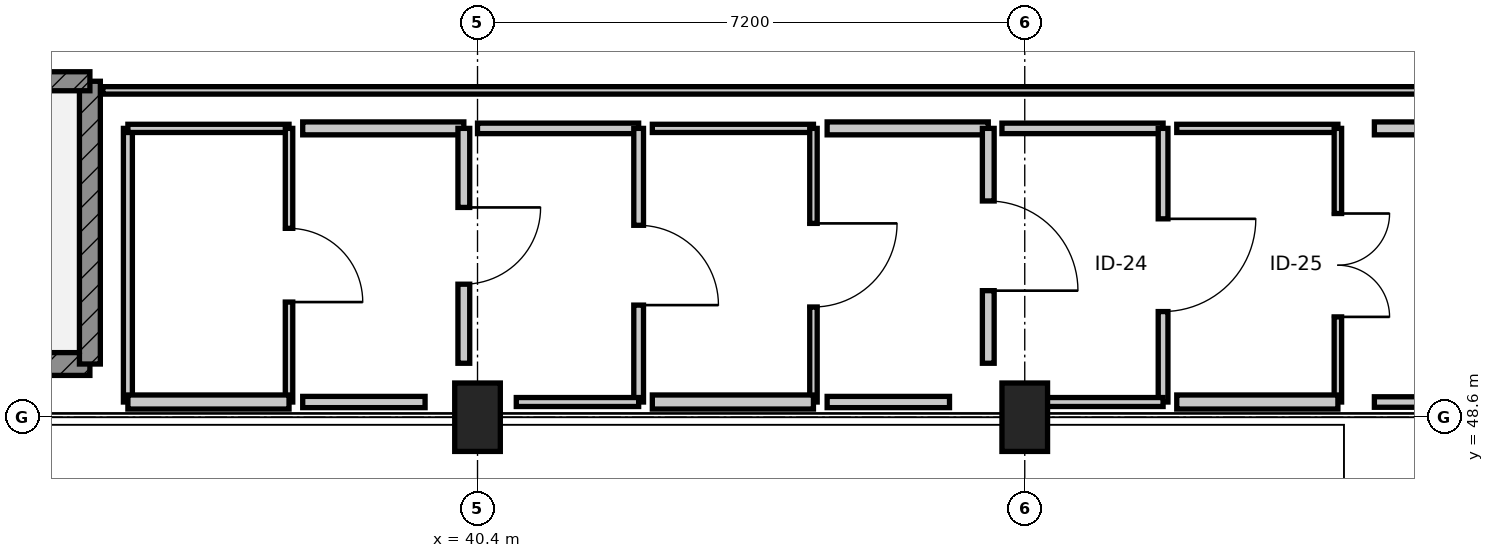
"""IFC4 building model, lengths in metres.
Left out: names, types, materials, properties, quantities, classifications, styles, units other than length and angle.
Written with IfcOpenShell. Run it as: python <this file> out.ifc"""

import sys

from ifc_helpers import new_model, si_unit, direction, frame, frame_2d, origin, origin_2d, place, context, subcontext, project, spatial, rectangle, extrude, element, fill, save


model = new_model("IFC4")
c1 = context("Model", 3, precision=1e-05, world=origin(), true_north=direction((0.0, 1.0)))
c2 = subcontext(c1, "Body", "Model", "MODEL_VIEW")
j1 = project(units=[si_unit("LENGTHUNIT", "METRE"), si_unit("PLANEANGLEUNIT", "RADIAN")], contexts=[c1])
p1 = place(None, origin())
s1 = spatial("IfcSite", under=j1, at=p1, CompositionType="ELEMENT")
p2 = place(p1, origin())
s2 = spatial("IfcBuilding", under=s1, at=p2, CompositionType="ELEMENT")
p3 = place(p2, frame((0.0, 0.0, 5.4)))
s3 = spatial("IfcBuildingStorey", under=s2, at=p3, CompositionType="ELEMENT", Elevation=5.4)
for number, where, z_axis, x_axis in (
    (1, (40.4, 48.6, 0.0), (0.0, 0.0, 1.0), (1.0, 0.0, 0.0)),
    (2, (47.6, 48.6, 0.0), (0.0, 0.0, 1.0), (1.0, 0.0, 0.0)),
):
    element("IfcColumn", number, at=place(p3, frame(where, z_axis=z_axis, x_axis=x_axis)), inside=s3, PredefinedType="COLUMN", context=c2, shape_type="SweptSolid", body=[
        extrude(rectangle(XDim=0.6, YDim=0.9, at=origin_2d()), origin(), (0.0, 0.0, 1.0), 5.1),
    ])
p4 = place(p3, frame((26.7, 49.3, 0.0), z_axis=(0.0, 0.0, 1.0), x_axis=(1.0, 0.0, 0.0)))
e3 = element("IfcWall", 3, at=p4, inside=s3, PredefinedType="SHEAR", context=c2, shape_type="SweptSolid", body=[
    extrude(rectangle(XDim=8.6, YDim=0.3, at=frame_2d((4.3, 0.0))), origin(), (0.0, 0.0, 1.0), 4.78),
])
p5 = place(p3, frame((35.3, 49.3, 0.0), z_axis=(0.0, 0.0, 1.0), x_axis=(0.0, 1.0, 0.0)))
e4 = element("IfcWall", 4, at=p5, inside=s3, PredefinedType="SHEAR", context=c2, shape_type="SweptSolid", body=[
    extrude(rectangle(XDim=3.72, YDim=0.275, at=frame_2d((1.86, 0.0))), origin(), (0.0, 0.0, 1.0), 4.78),
])
p6 = place(p3, frame((35.3, 53.02, 0.0), z_axis=(0.0, 0.0, 1.0), x_axis=(-1.0, 0.0, 0.0)))
e5 = element("IfcWall", 5, at=p6, inside=s3, PredefinedType="SHEAR", context=c2, shape_type="SweptSolid", body=[
    extrude(rectangle(XDim=8.6, YDim=0.25, at=frame_2d((4.3, 0.0))), origin(), (0.0, 0.0, 1.0), 4.78),
])
p7 = place(p6, frame((7.06, 0.0, 0.0)))
e6 = element("IfcOpeningElement", 6, at=p7, cuts=e5, PredefinedType="OPENING", context=c2, shape_type="SweptSolid", body=[
    extrude(rectangle(XDim=1.1, YDim=2.1, at=frame_2d((0.55, 1.05))), frame((0.0, 0.135, 0.0), z_axis=(0.0, -1.0, 0.0), x_axis=(1.0, 0.0, 0.0)), (0.0, 0.0, 1.0), 0.27),
])
p8 = place(p3, frame((35.8, 48.8, 0.0), z_axis=(0.0, 0.0, 1.0), x_axis=(0.0, 1.0, 0.0)))
e7 = element("IfcWall", 7, at=p8, inside=s3, PredefinedType="PARTITIONING", context=c2, shape_type="SweptSolid", body=[
    extrude(rectangle(XDim=3.6, YDim=0.118, at=frame_2d((1.8, 0.0))), origin(), (0.0, 0.0, 1.0), 4.78),
])
p9 = place(p3, frame((35.8, 52.4, 0.0), z_axis=(0.0, 0.0, 1.0), x_axis=(1.0, 0.0, 0.0)))
e8 = element("IfcWall", 8, at=p9, inside=s3, PredefinedType="PARTITIONING", context=c2, shape_type="SweptSolid", body=[
    extrude(rectangle(XDim=2.12, YDim=0.108, at=frame_2d((1.06, 0.0))), origin(), (0.0, 0.0, 1.0), 4.78),
])
p10 = place(p3, frame((37.92, 52.4, 0.0), z_axis=(0.0, 0.0, 1.0), x_axis=(0.0, -1.0, 0.0)))
e9 = element("IfcWall", 9, at=p10, inside=s3, PredefinedType="PARTITIONING", context=c2, shape_type="SweptSolid", body=[
    extrude(rectangle(XDim=3.6, YDim=0.098, at=frame_2d((1.8, 0.0))), origin(), (0.0, 0.0, 1.0), 4.78),
])
p11 = place(p10, frame((1.315, 0.0, 0.0)))
e10 = element("IfcOpeningElement", 10, at=p11, cuts=e9, PredefinedType="OPENING", context=c2, shape_type="SweptSolid", body=[
    extrude(rectangle(XDim=0.97, YDim=2.16, at=frame_2d((0.485, 1.08))), frame((0.0, 0.059, 0.0), z_axis=(0.0, -1.0, 0.0), x_axis=(1.0, 0.0, 0.0)), (0.0, 0.0, 1.0), 0.118),
])
p12 = place(p3, frame((37.92, 48.8, 0.0), z_axis=(0.0, 0.0, 1.0), x_axis=(-1.0, 0.0, 0.0)))
e11 = element("IfcWall", 11, at=p12, inside=s3, PredefinedType="PARTITIONING", context=c2, shape_type="SweptSolid", body=[
    extrude(rectangle(XDim=2.12, YDim=0.185, at=frame_2d((1.06, 0.0))), origin(), (0.0, 0.0, 1.0), 4.153),
])
p13 = place(p3, frame((38.1, 52.4, 0.0), z_axis=(0.0, 0.0, 1.0), x_axis=(1.0, 0.0, 0.0)))
e12 = element("IfcWall", 12, at=p13, inside=s3, PredefinedType="PARTITIONING", context=c2, shape_type="SweptSolid", body=[
    extrude(rectangle(XDim=2.12, YDim=0.17, at=frame_2d((1.06, 0.0))), origin(), (0.0, 0.0, 1.0), 4.229),
])
p14 = place(p3, frame((40.22, 52.4, 0.0), z_axis=(0.0, 0.0, 1.0), x_axis=(0.0, -1.0, 0.0)))
e13 = element("IfcWall", 13, at=p14, inside=s3, PredefinedType="PARTITIONING", context=c2, shape_type="SweptSolid", body=[
    extrude(rectangle(XDim=3.09, YDim=0.155, at=frame_2d((1.545, 0.0))), origin(), (0.0, 0.0, 1.0), 4.229),
])
p15 = place(p14, frame((1.04, 0.0, 0.0)))
e14 = element("IfcOpeningElement", 14, at=p15, cuts=e13, PredefinedType="OPENING", context=c2, shape_type="SweptSolid", body=[
    extrude(rectangle(XDim=1.01, YDim=2.16, at=frame_2d((0.505, 1.08))), frame((0.0, 0.087, 0.0), z_axis=(0.0, -1.0, 0.0), x_axis=(1.0, 0.0, 0.0)), (0.0, 0.0, 1.0), 0.175),
])
p16 = place(p3, frame((39.71, 48.8, 0.0), z_axis=(0.0, 0.0, 1.0), x_axis=(-1.0, 0.0, 0.0)))
e15 = element("IfcWall", 15, at=p16, inside=s3, PredefinedType="PARTITIONING", context=c2, shape_type="SweptSolid", body=[
    extrude(rectangle(XDim=1.61, YDim=0.148, at=frame_2d((0.805, 0.0))), origin(), (0.0, 0.0, 1.0), 4.153),
])
p17 = place(p3, frame((40.4, 52.4, 0.0), z_axis=(0.0, 0.0, 1.0), x_axis=(1.0, 0.0, 0.0)))
e16 = element("IfcWall", 16, at=p17, inside=s3, PredefinedType="PARTITIONING", context=c2, shape_type="SweptSolid", body=[
    extrude(rectangle(XDim=2.12, YDim=0.138, at=frame_2d((1.06, 0.0))), origin(), (0.0, 0.0, 1.0), 4.229),
])
p18 = place(p3, frame((42.52, 52.4, 0.0), z_axis=(0.0, 0.0, 1.0), x_axis=(0.0, -1.0, 0.0)))
e17 = element("IfcWall", 17, at=p18, inside=s3, PredefinedType="PARTITIONING", context=c2, shape_type="SweptSolid", body=[
    extrude(rectangle(XDim=3.6, YDim=0.128, at=frame_2d((1.8, 0.0))), origin(), (0.0, 0.0, 1.0), 4.407),
])
p19 = place(p18, frame((1.275, 0.0, 0.0)))
e18 = element("IfcOpeningElement", 18, at=p19, cuts=e17, PredefinedType="OPENING", context=c2, shape_type="SweptSolid", body=[
    extrude(rectangle(XDim=1.05, YDim=2.18, at=frame_2d((0.525, 1.09))), frame((0.0, 0.074, 0.0), z_axis=(0.0, -1.0, 0.0), x_axis=(1.0, 0.0, 0.0)), (0.0, 0.0, 1.0), 0.148),
])
p20 = place(p3, frame((42.52, 48.8, 0.0), z_axis=(0.0, 0.0, 1.0), x_axis=(-1.0, 0.0, 0.0)))
e19 = element("IfcWall", 19, at=p20, inside=s3, PredefinedType="PARTITIONING", context=c2, shape_type="SweptSolid", body=[
    extrude(rectangle(XDim=1.61, YDim=0.118, at=frame_2d((0.805, 0.0))), origin(), (0.0, 0.0, 1.0), 4.153),
])
p21 = place(p3, frame((42.7, 52.4, 0.0), z_axis=(0.0, 0.0, 1.0), x_axis=(1.0, 0.0, 0.0)))
e20 = element("IfcWall", 20, at=p21, inside=s3, PredefinedType="PARTITIONING", context=c2, shape_type="SweptSolid", body=[
    extrude(rectangle(XDim=2.12, YDim=0.108, at=frame_2d((1.06, 0.0))), origin(), (0.0, 0.0, 1.0), 4.78),
])
p22 = place(p3, frame((44.82, 52.4, 0.0), z_axis=(0.0, 0.0, 1.0), x_axis=(0.0, -1.0, 0.0)))
e21 = element("IfcWall", 21, at=p22, inside=s3, PredefinedType="PARTITIONING", context=c2, shape_type="SweptSolid", body=[
    extrude(rectangle(XDim=3.6, YDim=0.098, at=frame_2d((1.8, 0.0))), origin(), (0.0, 0.0, 1.0), 4.407),
])
p23 = place(p22, frame((1.25, 0.0, 0.0)))
e22 = element("IfcOpeningElement", 22, at=p23, cuts=e21, PredefinedType="OPENING", context=c2, shape_type="SweptSolid", body=[
    extrude(rectangle(XDim=1.1, YDim=2.18, at=frame_2d((0.55, 1.09))), frame((0.0, 0.059, 0.0), z_axis=(0.0, -1.0, 0.0), x_axis=(1.0, 0.0, 0.0)), (0.0, 0.0, 1.0), 0.118),
])
p24 = place(p3, frame((44.82, 48.8, 0.0), z_axis=(0.0, 0.0, 1.0), x_axis=(-1.0, 0.0, 0.0)))
e23 = element("IfcWall", 23, at=p24, inside=s3, PredefinedType="PARTITIONING", context=c2, shape_type="SweptSolid", body=[
    extrude(rectangle(XDim=2.12, YDim=0.185, at=frame_2d((1.06, 0.0))), origin(), (0.0, 0.0, 1.0), 4.153),
])
p25 = place(p3, frame((45.0, 52.4, 0.0), z_axis=(0.0, 0.0, 1.0), x_axis=(1.0, 0.0, 0.0)))
e24 = element("IfcWall", 24, at=p25, inside=s3, PredefinedType="PARTITIONING", context=c2, shape_type="SweptSolid", body=[
    extrude(rectangle(XDim=2.12, YDim=0.17, at=frame_2d((1.06, 0.0))), origin(), (0.0, 0.0, 1.0), 4.407),
])
p26 = place(p3, frame((47.12, 52.4, 0.0), z_axis=(0.0, 0.0, 1.0), x_axis=(0.0, -1.0, 0.0)))
e25 = element("IfcWall", 25, at=p26, inside=s3, PredefinedType="PARTITIONING", context=c2, shape_type="SweptSolid", body=[
    extrude(rectangle(XDim=3.09, YDim=0.155, at=frame_2d((1.545, 0.0))), origin(), (0.0, 0.0, 1.0), 4.407),
])
p27 = place(p26, frame((0.955, 0.0, 0.0)))
e26 = element("IfcOpeningElement", 26, at=p27, cuts=e25, PredefinedType="OPENING", context=c2, shape_type="SweptSolid", body=[
    extrude(rectangle(XDim=1.18, YDim=2.22, at=frame_2d((0.59, 1.11))), frame((0.0, 0.087, 0.0), z_axis=(0.0, -1.0, 0.0), x_axis=(1.0, 0.0, 0.0)), (0.0, 0.0, 1.0), 0.175),
])
p28 = place(p3, frame((46.61, 48.8, 0.0), z_axis=(0.0, 0.0, 1.0), x_axis=(-1.0, 0.0, 0.0)))
e27 = element("IfcWall", 27, at=p28, inside=s3, PredefinedType="PARTITIONING", context=c2, shape_type="SweptSolid", body=[
    extrude(rectangle(XDim=1.61, YDim=0.148, at=frame_2d((0.805, 0.0))), origin(), (0.0, 0.0, 1.0), 4.153),
])
p29 = place(p3, frame((47.3, 52.4, 0.0), z_axis=(0.0, 0.0, 1.0), x_axis=(1.0, 0.0, 0.0)))
e28 = element("IfcWall", 28, at=p29, inside=s3, PredefinedType="PARTITIONING", context=c2, shape_type="SweptSolid", body=[
    extrude(rectangle(XDim=2.12, YDim=0.138, at=frame_2d((1.06, 0.0))), origin(), (0.0, 0.0, 1.0), 4.229),
])
p30 = place(p3, frame((49.42, 52.4, 0.0), z_axis=(0.0, 0.0, 1.0), x_axis=(0.0, -1.0, 0.0)))
e29 = element("IfcWall", 29, at=p30, inside=s3, PredefinedType="PARTITIONING", context=c2, shape_type="SweptSolid", body=[
    extrude(rectangle(XDim=3.6, YDim=0.128, at=frame_2d((1.8, 0.0))), origin(), (0.0, 0.0, 1.0), 4.407),
])
p31 = place(p30, frame((1.19, 0.0, 0.0)))
e30 = element("IfcOpeningElement", 30, at=p31, cuts=e29, PredefinedType="OPENING", context=c2, shape_type="SweptSolid", body=[
    extrude(rectangle(XDim=1.22, YDim=2.24, at=frame_2d((0.61, 1.12))), frame((0.0, 0.074, 0.0), z_axis=(0.0, -1.0, 0.0), x_axis=(1.0, 0.0, 0.0)), (0.0, 0.0, 1.0), 0.148),
])
p32 = place(p3, frame((49.42, 48.8, 0.0), z_axis=(0.0, 0.0, 1.0), x_axis=(-1.0, 0.0, 0.0)))
e31 = element("IfcWall", 31, at=p32, inside=s3, PredefinedType="PARTITIONING", context=c2, shape_type="SweptSolid", body=[
    extrude(rectangle(XDim=1.61, YDim=0.118, at=frame_2d((0.805, 0.0))), origin(), (0.0, 0.0, 1.0), 4.153),
])
p33 = place(p3, frame((49.6, 52.4, 0.0), z_axis=(0.0, 0.0, 1.0), x_axis=(1.0, 0.0, 0.0)))
e32 = element("IfcWall", 32, at=p33, inside=s3, PredefinedType="PARTITIONING", context=c2, shape_type="SweptSolid", body=[
    extrude(rectangle(XDim=2.12, YDim=0.108, at=frame_2d((1.06, 0.0))), origin(), (0.0, 0.0, 1.0), 4.78),
])
p34 = place(p3, frame((51.72, 52.4, 0.0), z_axis=(0.0, 0.0, 1.0), x_axis=(0.0, -1.0, 0.0)))
e33 = element("IfcWall", 33, at=p34, inside=s3, PredefinedType="PARTITIONING", context=c2, shape_type="SweptSolid", body=[
    extrude(rectangle(XDim=3.6, YDim=0.098, at=frame_2d((1.8, 0.0))), origin(), (0.0, 0.0, 1.0), 4.407),
])
p35 = place(p34, frame((1.12, 0.0, 0.0)))
e34 = element("IfcOpeningElement", 34, at=p35, cuts=e33, PredefinedType="OPENING", context=c2, shape_type="SweptSolid", body=[
    extrude(rectangle(XDim=1.36, YDim=2.22, at=frame_2d((0.68, 1.11))), frame((0.0, 0.059, 0.0), z_axis=(0.0, -1.0, 0.0), x_axis=(1.0, 0.0, 0.0)), (0.0, 0.0, 1.0), 0.118),
])
p36 = place(p3, frame((51.72, 48.8, 0.0), z_axis=(0.0, 0.0, 1.0), x_axis=(-1.0, 0.0, 0.0)))
e35 = element("IfcWall", 35, at=p36, inside=s3, PredefinedType="PARTITIONING", context=c2, shape_type="SweptSolid", body=[
    extrude(rectangle(XDim=2.12, YDim=0.185, at=frame_2d((1.06, 0.0))), origin(), (0.0, 0.0, 1.0), 4.153),
])
p37 = place(p3, frame((52.2, 52.4, 0.0), z_axis=(0.0, 0.0, 1.0), x_axis=(1.0, 0.0, 0.0)))
e36 = element("IfcWall", 36, at=p37, inside=s3, PredefinedType="PARTITIONING", context=c2, shape_type="SweptSolid", body=[
    extrude(rectangle(XDim=9.2, YDim=0.17, at=frame_2d((4.6, 0.0))), origin(), (0.0, 0.0, 1.0), 4.229),
])
p38 = place(p37, frame((3.82, 0.0, 0.0)))
e37 = element("IfcOpeningElement", 37, at=p38, cuts=e36, PredefinedType="OPENING", context=c2, shape_type="SweptSolid", body=[
    extrude(rectangle(XDim=1.56, YDim=2.26, at=frame_2d((0.78, 1.13))), frame((0.0, 0.095, 0.0), z_axis=(0.0, -1.0, 0.0), x_axis=(1.0, 0.0, 0.0)), (0.0, 0.0, 1.0), 0.19),
])
p39 = place(p3, frame((57.555, 48.8, 0.0), z_axis=(0.0, 0.0, 1.0), x_axis=(-1.0, 0.0, 0.0)))
e38 = element("IfcWall", 38, at=p39, inside=s3, PredefinedType="PARTITIONING", context=c2, shape_type="SweptSolid", body=[
    extrude(rectangle(XDim=5.355, YDim=0.138, at=frame_2d((2.677, 0.0))), origin(), (0.0, 0.0, 1.0), 4.153),
])
p40 = place(p3, frame((54.0, 52.9, 0.0), z_axis=(0.0, 0.0, 1.0), x_axis=(-1.0, 0.0, 0.0)))
e39 = element("IfcWall", 39, at=p40, inside=s3, PredefinedType="PARTITIONING", context=c2, shape_type="SweptSolid", body=[
    extrude(rectangle(XDim=18.53, YDim=0.098, at=frame_2d((9.265, 0.0))), origin(), (0.0, 0.0, 1.0), 4.229),
])
p41 = place(p11, origin())
e40 = element("IfcDoor", 40, at=p41, inside=s3, OperationType="SINGLE_SWING_RIGHT", PredefinedType="DOOR", context=c2, shape_type="SweptSolid", body=[
    extrude(rectangle(XDim=0.97, YDim=2.16, at=frame_2d((0.485, 1.08))), frame((0.0, 0.025, 0.0), z_axis=(0.0, -1.0, 0.0), x_axis=(1.0, 0.0, 0.0)), (0.0, 0.0, 1.0), 0.05),
])
fill(e10, e40)
p42 = place(p15, origin())
e41 = element("IfcDoor", 41, at=p42, inside=s3, OperationType="SINGLE_SWING_LEFT", PredefinedType="DOOR", context=c2, shape_type="SweptSolid", body=[
    extrude(rectangle(XDim=1.01, YDim=2.16, at=frame_2d((0.505, 1.08))), frame((0.0, 0.025, 0.0), z_axis=(0.0, -1.0, 0.0), x_axis=(1.0, 0.0, 0.0)), (0.0, 0.0, 1.0), 0.05),
])
fill(e14, e41)
p43 = place(p19, origin())
e42 = element("IfcDoor", 42, at=p43, inside=s3, OperationType="SINGLE_SWING_RIGHT", PredefinedType="DOOR", context=c2, shape_type="SweptSolid", body=[
    extrude(rectangle(XDim=1.05, YDim=2.18, at=frame_2d((0.525, 1.09))), frame((0.0, 0.025, 0.0), z_axis=(0.0, -1.0, 0.0), x_axis=(1.0, 0.0, 0.0)), (0.0, 0.0, 1.0), 0.05),
])
fill(e18, e42)
p44 = place(p23, origin())
e43 = element("IfcDoor", 43, at=p44, inside=s3, OperationType="SINGLE_SWING_LEFT", PredefinedType="DOOR", context=c2, shape_type="SweptSolid", body=[
    extrude(rectangle(XDim=1.1, YDim=2.18, at=frame_2d((0.55, 1.09))), frame((0.0, 0.025, 0.0), z_axis=(0.0, -1.0, 0.0), x_axis=(1.0, 0.0, 0.0)), (0.0, 0.0, 1.0), 0.05),
])
fill(e22, e43)
p45 = place(p27, origin())
e44 = element("IfcDoor", 44, at=p45, inside=s3, OperationType="SINGLE_SWING_RIGHT", PredefinedType="DOOR", context=c2, shape_type="SweptSolid", body=[
    extrude(rectangle(XDim=1.18, YDim=2.22, at=frame_2d((0.59, 1.11))), frame((0.0, 0.025, 0.0), z_axis=(0.0, -1.0, 0.0), x_axis=(1.0, 0.0, 0.0)), (0.0, 0.0, 1.0), 0.05),
])
fill(e26, e44)
p46 = place(p31, origin())
e45 = element("IfcDoor", 45, at=p46, inside=s3, OperationType="SINGLE_SWING_LEFT", PredefinedType="DOOR", context=c2, shape_type="SweptSolid", body=[
    extrude(rectangle(XDim=1.22, YDim=2.24, at=frame_2d((0.61, 1.12))), frame((0.0, 0.025, 0.0), z_axis=(0.0, -1.0, 0.0), x_axis=(1.0, 0.0, 0.0)), (0.0, 0.0, 1.0), 0.05),
])
fill(e30, e45)
p47 = place(p35, origin())
e46 = element("IfcDoor", 46, at=p47, inside=s3, OperationType="DOUBLE_DOOR_SINGLE_SWING", PredefinedType="DOOR", context=c2, shape_type="SweptSolid", body=[
    extrude(rectangle(XDim=1.36, YDim=2.22, at=frame_2d((0.68, 1.11))), frame((0.0, 0.025, 0.0), z_axis=(0.0, -1.0, 0.0), x_axis=(1.0, 0.0, 0.0)), (0.0, 0.0, 1.0), 0.05),
])
fill(e34, e46)
save(model, sys.argv[1])
